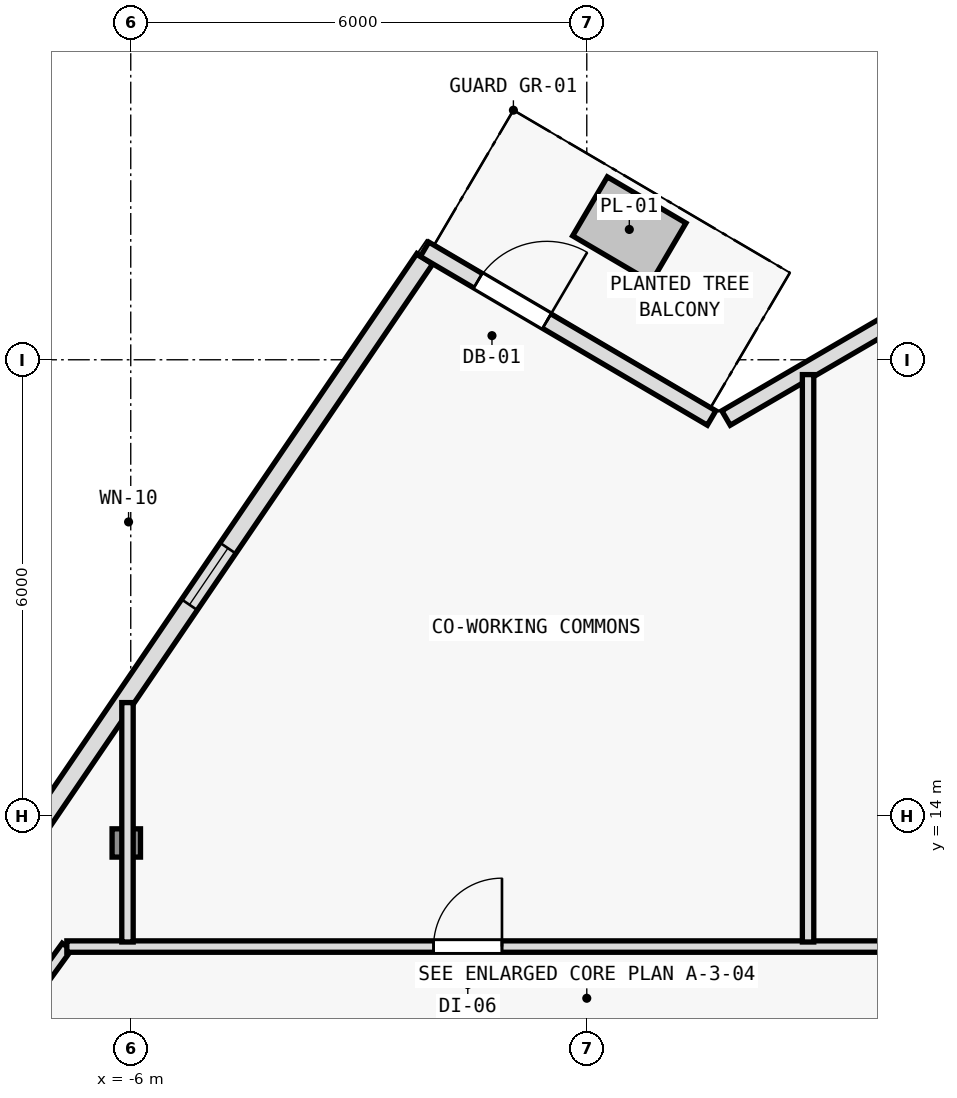
"""IFC4 building model, lengths in metres.
Left out: names, types, materials, properties, quantities, classifications, styles, units other than length and angle.
Written with IfcOpenShell. Run it as: python <this file> out.ifc"""

import sys

from ifc_helpers import new_model, si_unit, direction, frame, frame_2d, origin, origin_2d, place, context, subcontext, project, spatial, rectangle, i_section, extrude, element, fill, save


model = new_model("IFC4")
c1 = context("Model", 3, precision=1e-05, world=origin(), true_north=direction((0.0, 1.0)))
c2 = subcontext(c1, "Body", "Model", "MODEL_VIEW")
j1 = project(units=[si_unit("LENGTHUNIT", "METRE"), si_unit("PLANEANGLEUNIT", "RADIAN")], contexts=[c1])
p1 = place(None, origin())
s1 = spatial("IfcSite", under=j1, at=p1, CompositionType="ELEMENT")
p2 = place(p1, origin())
s2 = spatial("IfcBuilding", under=s1, at=p2, CompositionType="ELEMENT")
p3 = place(p2, frame((0.0, 0.0, 254.4)))
s3 = spatial("IfcBuildingStorey", under=s2, at=p3, CompositionType="ELEMENT", Elevation=254.4)
p4 = place(p3, frame((-6.059, 13.643, 0.006), z_axis=(0.008775143007, -0.002584925847, 0.999958156636), x_axis=(0.282568886397, 0.959247009086, 0.0)))
e1 = element("IfcColumn", 1, at=p4, inside=s3, PredefinedType="COLUMN", context=c2, shape_type="SweptSolid", body=[
    extrude(i_section(OverallWidth=0.374, OverallDepth=0.372, WebThickness=0.012, FlangeThickness=0.02, FilletRadius=0.015, at=origin_2d()), origin(), (0.0, 0.0, 1.0), 3.589),
])
p5 = place(p3, frame((-7.817, 12.971, 0.0), z_axis=(0.0, 0.0, 1.0), x_axis=(0.562474530687, 0.826814611826, 0.0)))
e2 = element("IfcWall", 2, at=p5, inside=s3, PredefinedType="SOLIDWALL", context=c2, shape_type="SweptSolid", body=[
    extrude(rectangle(XDim=10.107, YDim=0.25, at=frame_2d((5.053, 0.0))), origin(), (0.0, 0.0, 1.0), 3.35),
])
p6 = place(p5, frame((4.604, 0.0, 0.62)))
e3 = element("IfcOpeningElement", 3, at=p6, cuts=e2, PredefinedType="OPENING", context=c2, shape_type="SweptSolid", body=[
    extrude(rectangle(XDim=0.9, YDim=1.6, at=frame_2d((0.45, 0.8))), frame((0.0, 0.135, 0.0), z_axis=(0.0, -1.0, 0.0), x_axis=(1.0, 0.0, 0.0)), (0.0, 0.0, 1.0), 0.27),
])
p7 = place(p3, frame((1.832, 19.234, 0.0), z_axis=(0.0, 0.0, 1.0), x_axis=(0.86397765749, 0.503530145432, 0.0)))
e4 = element("IfcWall", 4, at=p7, inside=s3, PredefinedType="SOLIDWALL", context=c2, shape_type="SweptSolid", body=[
    extrude(rectangle(XDim=3.964, YDim=0.22, at=frame_2d((1.982, 0.0))), origin(), (0.0, 0.0, 1.0), 3.35),
])
p8 = place(p3, frame((-2.134, 21.453, 0.0), z_axis=(0.0, 0.0, 1.0), x_axis=(0.862106131527, -0.506727755292, 0.0)))
e5 = element("IfcWall", 5, at=p8, inside=s3, PredefinedType="SOLIDWALL", context=c2, shape_type="SweptSolid", body=[
    extrude(rectangle(XDim=4.38, YDim=0.22, at=frame_2d((2.19, 0.0))), origin(), (0.0, 0.0, 1.0), 3.35),
])
p9 = place(p8, frame((0.815, 0.0, 0.0)))
e6 = element("IfcOpeningElement", 6, at=p9, cuts=e5, PredefinedType="OPENING", context=c2, shape_type="SweptSolid", body=[
    extrude(rectangle(XDim=1.05, YDim=2.15, at=frame_2d((0.525, 1.075))), frame((0.0, 0.12, 0.0), z_axis=(0.0, -1.0, 0.0), x_axis=(1.0, 0.0, 0.0)), (0.0, 0.0, 1.0), 0.24),
])
p10 = place(p3, frame((-9.78, 8.226, 0.0), z_axis=(0.0, 0.0, 1.0), x_axis=(0.586956386413, 0.809618552436, 0.0)))
e7 = element("IfcWall", 7, at=p10, inside=s3, PredefinedType="PARTITIONING", context=c2, shape_type="SweptSolid", body=[
    extrude(rectangle(XDim=5.008, YDim=0.15, at=frame_2d((2.504, 0.0))), origin(), (0.0, 0.0, 1.0), 2.925),
])
p11 = place(p10, frame((1.154, 0.0, 0.0)))
e8 = element("IfcOpeningElement", 8, at=p11, cuts=e7, PredefinedType="OPENING", context=c2, shape_type="SweptSolid", body=[
    extrude(rectangle(XDim=0.9, YDim=2.1, at=frame_2d((0.45, 1.05))), frame((0.0, 0.085, 0.0), z_axis=(0.0, -1.0, 0.0), x_axis=(1.0, 0.0, 0.0)), (0.0, 0.0, 1.0), 0.17),
])
p12 = place(p3, frame((-6.841, 12.28, 0.0), z_axis=(0.0, 0.0, 1.0), x_axis=(1.0, 0.0, 0.0)))
e9 = element("IfcWall", 9, at=p12, inside=s3, PredefinedType="PARTITIONING", context=c2, shape_type="SweptSolid", body=[
    extrude(rectangle(XDim=13.682, YDim=0.15, at=frame_2d((6.841, 0.0))), origin(), (0.0, 0.0, 1.0), 3.015),
])
p13 = place(p12, frame((4.825, 0.0, 0.0)))
e10 = element("IfcOpeningElement", 10, at=p13, cuts=e9, PredefinedType="OPENING", context=c2, shape_type="SweptSolid", body=[
    extrude(rectangle(XDim=0.9, YDim=2.1, at=frame_2d((0.45, 1.05))), frame((0.0, 0.085, 0.0), z_axis=(0.0, -1.0, 0.0), x_axis=(1.0, 0.0, 0.0)), (0.0, 0.0, 1.0), 0.17),
])
p14 = place(p3, frame((-6.043, 12.34, 0.0), z_axis=(0.0, 0.0, 1.0), x_axis=(0.0, 1.0, 0.0)))
e11 = element("IfcWall", 11, at=p14, inside=s3, PredefinedType="PARTITIONING", context=c2, shape_type="SweptSolid", body=[
    extrude(rectangle(XDim=3.15, YDim=0.15, at=frame_2d((1.575, 0.0))), origin(), (0.0, 0.0, 1.0), 3.015),
])
p15 = place(p3, frame((2.912, 12.34, 0.0), z_axis=(0.0, 0.0, 1.0), x_axis=(0.0, 1.0, 0.0)))
e12 = element("IfcWall", 12, at=p15, inside=s3, PredefinedType="PARTITIONING", context=c2, shape_type="SweptSolid", body=[
    extrude(rectangle(XDim=7.465, YDim=0.15, at=frame_2d((3.732, 0.0))), origin(), (0.0, 0.0, 1.0), 3.015),
])
p16 = place(p6, origin())
e13 = element("IfcWindow", 13, at=p16, inside=s3, PartitioningType="SINGLE_PANEL", PredefinedType="WINDOW", context=c2, shape_type="SweptSolid", body=[
    extrude(rectangle(XDim=0.9, YDim=1.6, at=frame_2d((0.45, 0.8))), frame((0.0, 0.03, 0.0), z_axis=(0.0, -1.0, 0.0), x_axis=(1.0, 0.0, 0.0)), (0.0, 0.0, 1.0), 0.06),
])
fill(e3, e13)
p17 = place(p9, origin())
e14 = element("IfcDoor", 14, at=p17, inside=s3, OperationType="SINGLE_SWING_RIGHT", PredefinedType="DOOR", context=c2, shape_type="SweptSolid", body=[
    extrude(rectangle(XDim=1.05, YDim=2.15, at=frame_2d((0.525, 1.075))), frame((0.0, 0.025, 0.0), z_axis=(0.0, -1.0, 0.0), x_axis=(1.0, 0.0, 0.0)), (0.0, 0.0, 1.0), 0.05),
])
fill(e6, e14)
p18 = place(p13, origin())
e15 = element("IfcDoor", 15, at=p18, inside=s3, OperationType="SINGLE_SWING_RIGHT", PredefinedType="DOOR", context=c2, shape_type="SweptSolid", body=[
    extrude(rectangle(XDim=0.9, YDim=2.1, at=frame_2d((0.45, 1.05))), frame((0.0, 0.025, 0.0), z_axis=(0.0, -1.0, 0.0), x_axis=(1.0, 0.0, 0.0)), (0.0, 0.0, 1.0), 0.05),
])
fill(e10, e15)
save(model, sys.argv[1])
